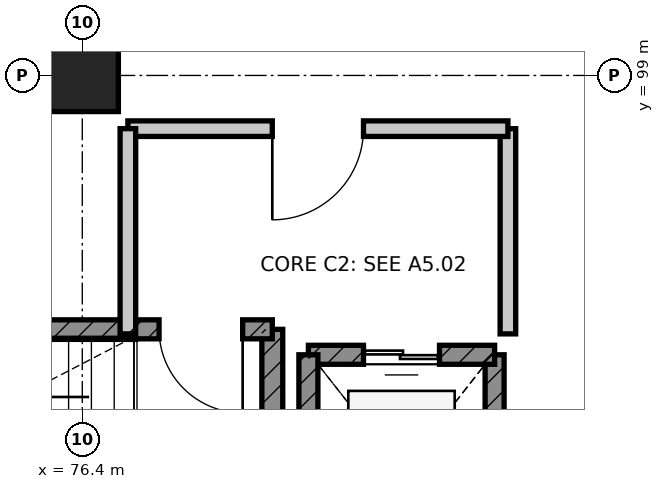
"""IFC4 building model, lengths in metres.
Left out: names, types, materials, properties, quantities, classifications, styles, units other than length and angle.
Written with IfcOpenShell. Run it as: python <this file> out.ifc"""

import sys

from ifc_helpers import new_model, si_unit, direction, frame, frame_2d, origin, origin_2d, place, context, subcontext, project, spatial, rectangle, extrude, element, fill, save


model = new_model("IFC4")
c1 = context("Model", 3, precision=1e-05, world=origin(), true_north=direction((0.0, 1.0)))
c2 = subcontext(c1, "Body", "Model", "MODEL_VIEW")
j1 = project(units=[si_unit("LENGTHUNIT", "METRE"), si_unit("PLANEANGLEUNIT", "RADIAN")], contexts=[c1])
p1 = place(None, origin())
s1 = spatial("IfcSite", under=j1, at=p1, CompositionType="ELEMENT")
p2 = place(p1, origin())
s2 = spatial("IfcBuilding", under=s1, at=p2, CompositionType="ELEMENT")
p3 = place(p2, origin())
s3 = spatial("IfcBuildingStorey", under=s2, at=p3, CompositionType="ELEMENT", Elevation=0.0)
p4 = place(p3, frame((76.4, 99.0, 0.0), z_axis=(0.0, 0.0, 1.0), x_axis=(1.0, 0.0, 0.0)))
e1 = element("IfcColumn", 1, at=p4, inside=s3, PredefinedType="COLUMN", context=c2, shape_type="SweptSolid", body=[
    extrude(rectangle(XDim=0.95, YDim=0.95, at=origin_2d()), origin(), (0.0, 0.0, 1.0), 5.4),
])
p5 = place(p3, frame((78.9, 92.1, 0.0), z_axis=(0.0, 0.0, 1.0), x_axis=(0.0, 1.0, 0.0)))
e2 = element("IfcWall", 2, at=p5, inside=s3, PredefinedType="SHEAR", context=c2, shape_type="SweptSolid", body=[
    extrude(rectangle(XDim=3.56, YDim=0.275, at=frame_2d((1.78, 0.0))), origin(), (0.0, 0.0, 1.0), 5.1),
])
p6 = place(p3, frame((78.9, 95.66, 0.0), z_axis=(0.0, 0.0, 1.0), x_axis=(-1.0, 0.0, 0.0)))
e3 = element("IfcWall", 3, at=p6, inside=s3, PredefinedType="SHEAR", context=c2, shape_type="SweptSolid", body=[
    extrude(rectangle(XDim=8.4, YDim=0.25, at=frame_2d((4.2, 0.0))), origin(), (0.0, 0.0, 1.0), 5.1),
])
p7 = place(p6, frame((0.39, 0.0, 0.0)))
e4 = element("IfcOpeningElement", 4, at=p7, cuts=e3, PredefinedType="OPENING", context=c2, shape_type="SweptSolid", body=[
    extrude(rectangle(XDim=1.1, YDim=2.1, at=frame_2d((0.55, 1.05))), frame((0.0, 0.135, 0.0), z_axis=(0.0, -1.0, 0.0), x_axis=(1.0, 0.0, 0.0)), (0.0, 0.0, 1.0), 0.27),
])
p8 = place(p3, frame((81.825, 92.275, 0.0), z_axis=(0.0, 0.0, 1.0), x_axis=(0.0, 1.0, 0.0)))
e5 = element("IfcWall", 5, at=p8, inside=s3, PredefinedType="SHEAR", context=c2, shape_type="SweptSolid", body=[
    extrude(rectangle(XDim=3.05, YDim=0.25, at=frame_2d((1.525, 0.0))), origin(), (0.0, 0.0, 1.0), 5.1),
])
p9 = place(p3, frame((81.825, 95.325, 0.0), z_axis=(0.0, 0.0, 1.0), x_axis=(-1.0, 0.0, 0.0)))
e6 = element("IfcWall", 6, at=p9, inside=s3, PredefinedType="SHEAR", context=c2, shape_type="SweptSolid", body=[
    extrude(rectangle(XDim=2.45, YDim=0.25, at=frame_2d((1.225, 0.0))), origin(), (0.0, 0.0, 1.0), 5.1),
])
p10 = place(p9, frame((0.725, 0.0, 0.0)))
e7 = element("IfcOpeningElement", 7, at=p10, cuts=e6, PredefinedType="OPENING", context=c2, shape_type="SweptSolid", body=[
    extrude(rectangle(XDim=1.0, YDim=2.15, at=frame_2d((0.5, 1.075))), frame((0.0, 0.135, 0.0), z_axis=(0.0, -1.0, 0.0), x_axis=(1.0, 0.0, 0.0)), (0.0, 0.0, 1.0), 0.27),
])
p11 = place(p3, frame((79.375, 95.325, 0.0), z_axis=(0.0, 0.0, 1.0), x_axis=(0.0, -1.0, 0.0)))
e8 = element("IfcWall", 8, at=p11, inside=s3, PredefinedType="SHEAR", context=c2, shape_type="SweptSolid", body=[
    extrude(rectangle(XDim=3.05, YDim=0.25, at=frame_2d((1.525, 0.0))), origin(), (0.0, 0.0, 1.0), 5.1),
])
p12 = place(p3, frame((82.0, 95.6, 0.0), z_axis=(0.0, 0.0, 1.0), x_axis=(0.0, 1.0, 0.0)))
e9 = element("IfcWall", 9, at=p12, inside=s3, PredefinedType="PARTITIONING", context=c2, shape_type="SweptSolid", body=[
    extrude(rectangle(XDim=2.7, YDim=0.205, at=frame_2d((1.35, 0.0))), origin(), (0.0, 0.0, 1.0), 5.1),
])
p13 = place(p3, frame((82.0, 98.3, 0.0), z_axis=(0.0, 0.0, 1.0), x_axis=(-1.0, 0.0, 0.0)))
e10 = element("IfcWall", 10, at=p13, inside=s3, PredefinedType="PARTITIONING", context=c2, shape_type="SweptSolid", body=[
    extrude(rectangle(XDim=5.0, YDim=0.205, at=frame_2d((2.5, 0.0))), origin(), (0.0, 0.0, 1.0), 5.1),
])
p14 = place(p13, frame((1.9, 0.0, 0.0)))
e11 = element("IfcOpeningElement", 11, at=p14, cuts=e10, PredefinedType="OPENING", context=c2, shape_type="SweptSolid", body=[
    extrude(rectangle(XDim=1.2, YDim=2.1, at=frame_2d((0.6, 1.05))), frame((0.0, 0.113, 0.0), z_axis=(0.0, -1.0, 0.0), x_axis=(1.0, 0.0, 0.0)), (0.0, 0.0, 1.0), 0.225),
])
p15 = place(p3, frame((77.0, 98.3, 0.0), z_axis=(0.0, 0.0, 1.0), x_axis=(0.0, -1.0, 0.0)))
e12 = element("IfcWall", 12, at=p15, inside=s3, PredefinedType="PARTITIONING", context=c2, shape_type="SweptSolid", body=[
    extrude(rectangle(XDim=2.7, YDim=0.205, at=frame_2d((1.35, 0.0))), origin(), (0.0, 0.0, 1.0), 5.1),
])
p16 = place(p7, origin())
e13 = element("IfcDoor", 13, at=p16, inside=s3, OperationType="SINGLE_SWING_LEFT", PredefinedType="DOOR", context=c2, shape_type="SweptSolid", body=[
    extrude(rectangle(XDim=1.1, YDim=2.1, at=frame_2d((0.55, 1.05))), frame((0.0, 0.025, 0.0), z_axis=(0.0, -1.0, 0.0), x_axis=(1.0, 0.0, 0.0)), (0.0, 0.0, 1.0), 0.05),
])
fill(e4, e13)
p17 = place(p10, origin())
e14 = element("IfcDoor", 14, at=p17, inside=s3, OperationType="DOUBLE_DOOR_SLIDING", PredefinedType="DOOR", context=c2, shape_type="SweptSolid", body=[
    extrude(rectangle(XDim=1.0, YDim=2.15, at=frame_2d((0.5, 1.075))), frame((0.0, 0.025, 0.0), z_axis=(0.0, -1.0, 0.0), x_axis=(1.0, 0.0, 0.0)), (0.0, 0.0, 1.0), 0.05),
])
fill(e7, e14)
p18 = place(p14, origin())
e15 = element("IfcDoor", 15, at=p18, inside=s3, OperationType="SINGLE_SWING_RIGHT", PredefinedType="DOOR", context=c2, shape_type="SweptSolid", body=[
    extrude(rectangle(XDim=1.2, YDim=2.1, at=frame_2d((0.6, 1.05))), frame((0.0, 0.025, 0.0), z_axis=(0.0, -1.0, 0.0), x_axis=(1.0, 0.0, 0.0)), (0.0, 0.0, 1.0), 0.05),
])
fill(e11, e15)
save(model, sys.argv[1])
